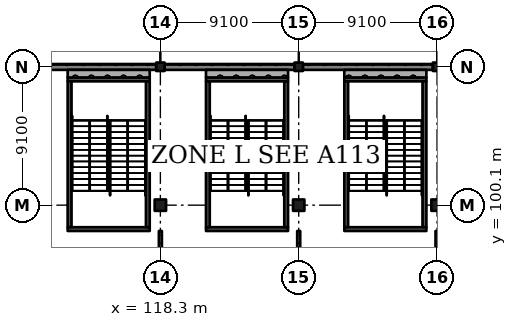
"""IFC4 building model, lengths in metres.
Left out: names, types, materials, properties, quantities, classifications, styles, units other than length and angle.
Written with IfcOpenShell. Run it as: python <this file> out.ifc"""

import sys

from ifc_helpers import new_model, si_unit, direction, frame, frame_2d, origin, origin_2d, place, context, subcontext, project, spatial, rectangle, extrude, element, fill, save


model = new_model("IFC4")
c1 = context("Model", 3, precision=1e-05, world=origin(), true_north=direction((0.0, 1.0)))
c2 = subcontext(c1, "Body", "Model", "MODEL_VIEW")
j1 = project(units=[si_unit("LENGTHUNIT", "METRE"), si_unit("PLANEANGLEUNIT", "RADIAN")], contexts=[c1])
p1 = place(None, origin())
s1 = spatial("IfcSite", under=j1, at=p1, CompositionType="ELEMENT")
p2 = place(p1, origin())
s2 = spatial("IfcBuilding", under=s1, at=p2, CompositionType="ELEMENT")
p3 = place(p2, origin())
s3 = spatial("IfcBuildingStorey", under=s2, at=p3, CompositionType="ELEMENT", Elevation=0.0)
p4 = place(p3, frame((118.3, 100.1, -0.4), z_axis=(0.0, 0.0, 1.0), x_axis=(1.0, 0.0, 0.0)))
e1 = element("IfcColumn", 1, at=p4, inside=s3, PredefinedType="COLUMN", context=c2, shape_type="SweptSolid", body=[
    extrude(rectangle(XDim=0.75, YDim=0.75, at=origin_2d()), origin(), (0.0, 0.0, 1.0), 6.77),
])
p5 = place(p3, frame((118.3, 109.2, -0.4), z_axis=(0.0, 0.0, 1.0), x_axis=(1.0, 0.0, 0.0)))
e2 = element("IfcColumn", 2, at=p5, inside=s3, PredefinedType="COLUMN", context=c2, shape_type="SweptSolid", body=[
    extrude(rectangle(XDim=0.55, YDim=0.55, at=origin_2d()), origin(), (0.0, 0.0, 1.0), 6.77),
])
p6 = place(p3, frame((127.4, 100.1, -0.4), z_axis=(0.0, 0.0, 1.0), x_axis=(1.0, 0.0, 0.0)))
e3 = element("IfcColumn", 3, at=p6, inside=s3, PredefinedType="COLUMN", context=c2, shape_type="SweptSolid", body=[
    extrude(rectangle(XDim=0.75, YDim=0.75, at=origin_2d()), origin(), (0.0, 0.0, 1.0), 6.77),
])
p7 = place(p3, frame((127.4, 109.2, -0.4), z_axis=(0.0, 0.0, 1.0), x_axis=(1.0, 0.0, 0.0)))
e4 = element("IfcColumn", 4, at=p7, inside=s3, PredefinedType="COLUMN", context=c2, shape_type="SweptSolid", body=[
    extrude(rectangle(XDim=0.55, YDim=0.55, at=origin_2d()), origin(), (0.0, 0.0, 1.0), 6.77),
])
p8 = place(p3, frame((136.5, 100.1, -0.4), z_axis=(0.0, 0.0, 1.0), x_axis=(1.0, 0.0, 0.0)))
e5 = element("IfcColumn", 5, at=p8, inside=s3, PredefinedType="COLUMN", context=c2, shape_type="SweptSolid", body=[
    extrude(rectangle(XDim=0.75, YDim=0.75, at=origin_2d()), origin(), (0.0, 0.0, 1.0), 6.77),
])
p9 = place(p3, frame((136.5, 109.2, -0.4), z_axis=(0.0, 0.0, 1.0), x_axis=(1.0, 0.0, 0.0)))
e6 = element("IfcColumn", 6, at=p9, inside=s3, PredefinedType="COLUMN", context=c2, shape_type="SweptSolid", body=[
    extrude(rectangle(XDim=0.55, YDim=0.55, at=origin_2d()), origin(), (0.0, 0.0, 1.0), 6.77),
])
p10 = place(p3, frame((135.8, 98.525, -0.4), z_axis=(0.0, 0.0, 1.0), x_axis=(-1.0, 0.0, 0.0)))
e7 = element("IfcWall", 7, at=p10, inside=s3, PredefinedType="SHEAR", context=c2, shape_type="SweptSolid", body=[
    extrude(rectangle(XDim=5.4, YDim=0.25, at=frame_2d((2.7, 0.0))), origin(), (0.0, 0.0, 1.0), 6.77),
])
p11 = place(p10, frame((1.5, 0.0, 0.4)))
e8 = element("IfcOpeningElement", 8, at=p11, cuts=e7, PredefinedType="OPENING", context=c2, shape_type="SweptSolid", body=[
    extrude(rectangle(XDim=2.4, YDim=2.1, at=frame_2d((1.2, 1.05))), frame((0.0, 0.135, 0.0), z_axis=(0.0, -1.0, 0.0), x_axis=(1.0, 0.0, 0.0)), (0.0, 0.0, 1.0), 0.27),
])
p12 = place(p3, frame((135.8, 108.375, -0.4), z_axis=(0.0, 0.0, 1.0), x_axis=(-1.0, 0.0, 0.0)))
e9 = element("IfcWall", 9, at=p12, inside=s3, PredefinedType="SHEAR", context=c2, shape_type="SweptSolid", body=[
    extrude(rectangle(XDim=5.4, YDim=0.25, at=frame_2d((2.7, 0.0))), origin(), (0.0, 0.0, 1.0), 6.77),
])
p13 = place(p3, frame((130.525, 108.25, -0.4), z_axis=(0.0, 0.0, 1.0), x_axis=(0.0, -1.0, 0.0)))
e10 = element("IfcWall", 10, at=p13, inside=s3, PredefinedType="SHEAR", context=c2, shape_type="SweptSolid", body=[
    extrude(rectangle(XDim=9.6, YDim=0.25, at=frame_2d((4.8, 0.0))), origin(), (0.0, 0.0, 1.0), 6.77),
])
p14 = place(p13, frame((7.95, 0.0, 0.4)))
e11 = element("IfcOpeningElement", 11, at=p14, cuts=e10, PredefinedType="OPENING", context=c2, shape_type="SweptSolid", body=[
    extrude(rectangle(XDim=1.2, YDim=2.1, at=frame_2d((0.6, 1.05))), frame((0.0, 0.135, 0.0), z_axis=(0.0, -1.0, 0.0), x_axis=(1.0, 0.0, 0.0)), (0.0, 0.0, 1.0), 0.27),
])
p15 = place(p3, frame((135.675, 108.25, -0.4), z_axis=(0.0, 0.0, 1.0), x_axis=(0.0, -1.0, 0.0)))
e12 = element("IfcWall", 12, at=p15, inside=s3, PredefinedType="SHEAR", context=c2, shape_type="SweptSolid", body=[
    extrude(rectangle(XDim=9.6, YDim=0.25, at=frame_2d((4.8, 0.0))), origin(), (0.0, 0.0, 1.0), 6.77),
])
p16 = place(p3, frame((126.7, 98.525, -0.4), z_axis=(0.0, 0.0, 1.0), x_axis=(-1.0, 0.0, 0.0)))
e13 = element("IfcWall", 13, at=p16, inside=s3, PredefinedType="SHEAR", context=c2, shape_type="SweptSolid", body=[
    extrude(rectangle(XDim=5.4, YDim=0.25, at=frame_2d((2.7, 0.0))), origin(), (0.0, 0.0, 1.0), 6.77),
])
p17 = place(p16, frame((1.5, 0.0, 0.4)))
e14 = element("IfcOpeningElement", 14, at=p17, cuts=e13, PredefinedType="OPENING", context=c2, shape_type="SweptSolid", body=[
    extrude(rectangle(XDim=2.4, YDim=2.1, at=frame_2d((1.2, 1.05))), frame((0.0, 0.135, 0.0), z_axis=(0.0, -1.0, 0.0), x_axis=(1.0, 0.0, 0.0)), (0.0, 0.0, 1.0), 0.27),
])
p18 = place(p3, frame((126.7, 108.375, -0.4), z_axis=(0.0, 0.0, 1.0), x_axis=(-1.0, 0.0, 0.0)))
e15 = element("IfcWall", 15, at=p18, inside=s3, PredefinedType="SHEAR", context=c2, shape_type="SweptSolid", body=[
    extrude(rectangle(XDim=5.4, YDim=0.25, at=frame_2d((2.7, 0.0))), origin(), (0.0, 0.0, 1.0), 6.77),
])
p19 = place(p3, frame((121.425, 108.25, -0.4), z_axis=(0.0, 0.0, 1.0), x_axis=(0.0, -1.0, 0.0)))
e16 = element("IfcWall", 16, at=p19, inside=s3, PredefinedType="SHEAR", context=c2, shape_type="SweptSolid", body=[
    extrude(rectangle(XDim=9.6, YDim=0.25, at=frame_2d((4.8, 0.0))), origin(), (0.0, 0.0, 1.0), 6.77),
])
p20 = place(p19, frame((7.95, 0.0, 0.4)))
e17 = element("IfcOpeningElement", 17, at=p20, cuts=e16, PredefinedType="OPENING", context=c2, shape_type="SweptSolid", body=[
    extrude(rectangle(XDim=1.2, YDim=2.1, at=frame_2d((0.6, 1.05))), frame((0.0, 0.135, 0.0), z_axis=(0.0, -1.0, 0.0), x_axis=(1.0, 0.0, 0.0)), (0.0, 0.0, 1.0), 0.27),
])
p21 = place(p3, frame((126.575, 108.25, -0.4), z_axis=(0.0, 0.0, 1.0), x_axis=(0.0, -1.0, 0.0)))
e18 = element("IfcWall", 18, at=p21, inside=s3, PredefinedType="SHEAR", context=c2, shape_type="SweptSolid", body=[
    extrude(rectangle(XDim=9.6, YDim=0.25, at=frame_2d((4.8, 0.0))), origin(), (0.0, 0.0, 1.0), 6.77),
])
p22 = place(p3, frame((117.6, 98.525, -0.4), z_axis=(0.0, 0.0, 1.0), x_axis=(-1.0, 0.0, 0.0)))
e19 = element("IfcWall", 19, at=p22, inside=s3, PredefinedType="SHEAR", context=c2, shape_type="SweptSolid", body=[
    extrude(rectangle(XDim=5.4, YDim=0.25, at=frame_2d((2.7, 0.0))), origin(), (0.0, 0.0, 1.0), 6.77),
])
p23 = place(p22, frame((1.5, 0.0, 0.4)))
e20 = element("IfcOpeningElement", 20, at=p23, cuts=e19, PredefinedType="OPENING", context=c2, shape_type="SweptSolid", body=[
    extrude(rectangle(XDim=2.4, YDim=2.1, at=frame_2d((1.2, 1.05))), frame((0.0, 0.135, 0.0), z_axis=(0.0, -1.0, 0.0), x_axis=(1.0, 0.0, 0.0)), (0.0, 0.0, 1.0), 0.27),
])
p24 = place(p3, frame((117.6, 108.375, -0.4), z_axis=(0.0, 0.0, 1.0), x_axis=(-1.0, 0.0, 0.0)))
e21 = element("IfcWall", 21, at=p24, inside=s3, PredefinedType="SHEAR", context=c2, shape_type="SweptSolid", body=[
    extrude(rectangle(XDim=5.4, YDim=0.25, at=frame_2d((2.7, 0.0))), origin(), (0.0, 0.0, 1.0), 6.77),
])
p25 = place(p3, frame((112.325, 108.25, -0.4), z_axis=(0.0, 0.0, 1.0), x_axis=(0.0, -1.0, 0.0)))
e22 = element("IfcWall", 22, at=p25, inside=s3, PredefinedType="SHEAR", context=c2, shape_type="SweptSolid", body=[
    extrude(rectangle(XDim=9.6, YDim=0.25, at=frame_2d((4.8, 0.0))), origin(), (0.0, 0.0, 1.0), 6.77),
])
p26 = place(p25, frame((7.95, 0.0, 0.4)))
e23 = element("IfcOpeningElement", 23, at=p26, cuts=e22, PredefinedType="OPENING", context=c2, shape_type="SweptSolid", body=[
    extrude(rectangle(XDim=1.2, YDim=2.1, at=frame_2d((0.6, 1.05))), frame((0.0, 0.135, 0.0), z_axis=(0.0, -1.0, 0.0), x_axis=(1.0, 0.0, 0.0)), (0.0, 0.0, 1.0), 0.27),
])
p27 = place(p3, frame((117.475, 108.25, -0.4), z_axis=(0.0, 0.0, 1.0), x_axis=(0.0, -1.0, 0.0)))
e24 = element("IfcWall", 24, at=p27, inside=s3, PredefinedType="SHEAR", context=c2, shape_type="SweptSolid", body=[
    extrude(rectangle(XDim=9.6, YDim=0.25, at=frame_2d((4.8, 0.0))), origin(), (0.0, 0.0, 1.0), 6.77),
])
p28 = place(p3, frame((136.225, 109.175, 0.0), z_axis=(0.0, 0.0, 1.0), x_axis=(-1.0, 0.0, 0.0)))
e25 = element("IfcWall", 25, at=p28, inside=s3, PredefinedType="SOLIDWALL", context=c2, shape_type="SweptSolid", body=[
    extrude(rectangle(XDim=8.55, YDim=0.35, at=frame_2d((4.275, 0.0))), origin(), (0.0, 0.0, 1.0), 5.27),
])
p29 = place(p28, frame((5.975, 0.0, 0.0)))
e26 = element("IfcOpeningElement", 26, at=p29, cuts=e25, PredefinedType="OPENING", context=c2, shape_type="SweptSolid", body=[
    extrude(rectangle(XDim=2.1, YDim=2.4, at=frame_2d((1.05, 1.2))), frame((0.0, 0.185, 0.0), z_axis=(0.0, -1.0, 0.0), x_axis=(1.0, 0.0, 0.0)), (0.0, 0.0, 1.0), 0.37),
])
p30 = place(p3, frame((127.125, 109.175, 0.0), z_axis=(0.0, 0.0, 1.0), x_axis=(-1.0, 0.0, 0.0)))
e27 = element("IfcWall", 27, at=p30, inside=s3, PredefinedType="SOLIDWALL", context=c2, shape_type="SweptSolid", body=[
    extrude(rectangle(XDim=8.55, YDim=0.35, at=frame_2d((4.275, 0.0))), origin(), (0.0, 0.0, 1.0), 5.27),
])
p31 = place(p30, frame((5.975, 0.0, 0.0)))
e28 = element("IfcOpeningElement", 28, at=p31, cuts=e27, PredefinedType="OPENING", context=c2, shape_type="SweptSolid", body=[
    extrude(rectangle(XDim=2.1, YDim=2.4, at=frame_2d((1.05, 1.2))), frame((0.0, 0.185, 0.0), z_axis=(0.0, -1.0, 0.0), x_axis=(1.0, 0.0, 0.0)), (0.0, 0.0, 1.0), 0.37),
])
p32 = place(p3, frame((118.025, 109.175, 0.0), z_axis=(0.0, 0.0, 1.0), x_axis=(-1.0, 0.0, 0.0)))
e29 = element("IfcWall", 29, at=p32, inside=s3, PredefinedType="SOLIDWALL", context=c2, shape_type="SweptSolid", body=[
    extrude(rectangle(XDim=8.5, YDim=0.35, at=frame_2d((4.25, 0.0))), origin(), (0.0, 0.0, 1.0), 5.27),
])
p33 = place(p32, frame((5.975, 0.0, 0.0)))
e30 = element("IfcOpeningElement", 30, at=p33, cuts=e29, PredefinedType="OPENING", context=c2, shape_type="SweptSolid", body=[
    extrude(rectangle(XDim=2.1, YDim=2.4, at=frame_2d((1.05, 1.2))), frame((0.0, 0.185, 0.0), z_axis=(0.0, -1.0, 0.0), x_axis=(1.0, 0.0, 0.0)), (0.0, 0.0, 1.0), 0.37),
])
p34 = place(p3, frame((130.4, 108.75, 0.0), z_axis=(0.0, 0.0, 1.0), x_axis=(1.0, 0.0, 0.0)))
e31 = element("IfcWall", 31, at=p34, inside=s3, PredefinedType="SOLIDWALL", context=c2, shape_type="SweptSolid", body=[
    extrude(rectangle(XDim=5.4, YDim=0.5, at=frame_2d((2.7, 0.0))), origin(), (0.0, 0.0, 1.0), 6.37),
])
p35 = place(p3, frame((121.3, 108.75, 0.0), z_axis=(0.0, 0.0, 1.0), x_axis=(1.0, 0.0, 0.0)))
e32 = element("IfcWall", 32, at=p35, inside=s3, PredefinedType="SOLIDWALL", context=c2, shape_type="SweptSolid", body=[
    extrude(rectangle(XDim=5.4, YDim=0.5, at=frame_2d((2.7, 0.0))), origin(), (0.0, 0.0, 1.0), 6.37),
])
p36 = place(p3, frame((112.2, 108.75, 0.0), z_axis=(0.0, 0.0, 1.0), x_axis=(1.0, 0.0, 0.0)))
e33 = element("IfcWall", 33, at=p36, inside=s3, PredefinedType="SOLIDWALL", context=c2, shape_type="SweptSolid", body=[
    extrude(rectangle(XDim=5.4, YDim=0.5, at=frame_2d((2.7, 0.0))), origin(), (0.0, 0.0, 1.0), 6.37),
])
p37 = place(p3, frame((118.3, 91.475, 0.0), z_axis=(0.0, 0.0, 1.0), x_axis=(0.0, 1.0, 0.0)))
e34 = element("IfcWall", 34, at=p37, inside=s3, PredefinedType="PARTITIONING", context=c2, shape_type="SweptSolid", body=[
    extrude(rectangle(XDim=6.925, YDim=0.2, at=frame_2d((3.462, 0.0))), origin(), (0.0, 0.0, 1.0), 5.32),
])
p38 = place(p37, frame((0.85, 0.0, 0.0)))
e35 = element("IfcOpeningElement", 35, at=p38, cuts=e34, PredefinedType="OPENING", context=c2, shape_type="SweptSolid", body=[
    extrude(rectangle(XDim=1.8, YDim=2.4, at=frame_2d((0.9, 1.2))), frame((0.0, 0.11, 0.0), z_axis=(0.0, -1.0, 0.0), x_axis=(1.0, 0.0, 0.0)), (0.0, 0.0, 1.0), 0.22),
])
p39 = place(p37, frame((4.25, 0.0, 0.0)))
e36 = element("IfcOpeningElement", 36, at=p39, cuts=e34, PredefinedType="OPENING", context=c2, shape_type="SweptSolid", body=[
    extrude(rectangle(XDim=1.8, YDim=2.4, at=frame_2d((0.9, 1.2))), frame((0.0, 0.11, 0.0), z_axis=(0.0, -1.0, 0.0), x_axis=(1.0, 0.0, 0.0)), (0.0, 0.0, 1.0), 0.22),
])
p40 = place(p3, frame((127.4, 91.45, 0.0), z_axis=(0.0, 0.0, 1.0), x_axis=(0.0, 1.0, 0.0)))
e37 = element("IfcWall", 37, at=p40, inside=s3, PredefinedType="PARTITIONING", context=c2, shape_type="SweptSolid", body=[
    extrude(rectangle(XDim=6.95, YDim=0.2, at=frame_2d((3.475, 0.0))), origin(), (0.0, 0.0, 1.0), 5.32),
])
p41 = place(p40, frame((0.85, 0.0, 0.0)))
e38 = element("IfcOpeningElement", 38, at=p41, cuts=e37, PredefinedType="OPENING", context=c2, shape_type="SweptSolid", body=[
    extrude(rectangle(XDim=1.8, YDim=2.4, at=frame_2d((0.9, 1.2))), frame((0.0, 0.11, 0.0), z_axis=(0.0, -1.0, 0.0), x_axis=(1.0, 0.0, 0.0)), (0.0, 0.0, 1.0), 0.22),
])
p42 = place(p40, frame((4.35, 0.0, 0.0)))
e39 = element("IfcOpeningElement", 39, at=p42, cuts=e37, PredefinedType="OPENING", context=c2, shape_type="SweptSolid", body=[
    extrude(rectangle(XDim=1.8, YDim=2.4, at=frame_2d((0.9, 1.2))), frame((0.0, 0.11, 0.0), z_axis=(0.0, -1.0, 0.0), x_axis=(1.0, 0.0, 0.0)), (0.0, 0.0, 1.0), 0.22),
])
p43 = place(p3, frame((136.5, 91.425, 0.0), z_axis=(0.0, 0.0, 1.0), x_axis=(0.0, 1.0, 0.0)))
e40 = element("IfcWall", 40, at=p43, inside=s3, PredefinedType="PARTITIONING", context=c2, shape_type="SweptSolid", body=[
    extrude(rectangle(XDim=6.975, YDim=0.2, at=frame_2d((3.487, 0.0))), origin(), (0.0, 0.0, 1.0), 5.32),
])
p44 = place(p43, frame((0.85, 0.0, 0.0)))
e41 = element("IfcOpeningElement", 41, at=p44, cuts=e40, PredefinedType="OPENING", context=c2, shape_type="SweptSolid", body=[
    extrude(rectangle(XDim=1.8, YDim=2.4, at=frame_2d((0.9, 1.2))), frame((0.0, 0.11, 0.0), z_axis=(0.0, -1.0, 0.0), x_axis=(1.0, 0.0, 0.0)), (0.0, 0.0, 1.0), 0.22),
])
p45 = place(p43, frame((4.35, 0.0, 0.0)))
e42 = element("IfcOpeningElement", 42, at=p45, cuts=e40, PredefinedType="OPENING", context=c2, shape_type="SweptSolid", body=[
    extrude(rectangle(XDim=1.8, YDim=2.4, at=frame_2d((0.9, 1.2))), frame((0.0, 0.11, 0.0), z_axis=(0.0, -1.0, 0.0), x_axis=(1.0, 0.0, 0.0)), (0.0, 0.0, 1.0), 0.22),
])
p46 = place(p29, frame((2.1, 0.0, 0.0), z_axis=(0.0, 0.0, 1.0), x_axis=(-1.0, 0.0, 0.0)))
e43 = element("IfcDoor", 43, at=p46, inside=s3, OperationType="DOUBLE_DOOR_SINGLE_SWING", PredefinedType="DOOR", context=c2, shape_type="SweptSolid", body=[
    extrude(rectangle(XDim=2.1, YDim=2.4, at=frame_2d((1.05, 1.2))), frame((0.0, 0.025, 0.0), z_axis=(0.0, -1.0, 0.0), x_axis=(1.0, 0.0, 0.0)), (0.0, 0.0, 1.0), 0.05),
])
fill(e26, e43)
p47 = place(p31, frame((2.1, 0.0, 0.0), z_axis=(0.0, 0.0, 1.0), x_axis=(-1.0, 0.0, 0.0)))
e44 = element("IfcDoor", 44, at=p47, inside=s3, OperationType="DOUBLE_DOOR_SINGLE_SWING", PredefinedType="DOOR", context=c2, shape_type="SweptSolid", body=[
    extrude(rectangle(XDim=2.1, YDim=2.4, at=frame_2d((1.05, 1.2))), frame((0.0, 0.025, 0.0), z_axis=(0.0, -1.0, 0.0), x_axis=(1.0, 0.0, 0.0)), (0.0, 0.0, 1.0), 0.05),
])
fill(e28, e44)
p48 = place(p33, frame((2.1, 0.0, 0.0), z_axis=(0.0, 0.0, 1.0), x_axis=(-1.0, 0.0, 0.0)))
e45 = element("IfcDoor", 45, at=p48, inside=s3, OperationType="DOUBLE_DOOR_SINGLE_SWING", PredefinedType="DOOR", context=c2, shape_type="SweptSolid", body=[
    extrude(rectangle(XDim=2.1, YDim=2.4, at=frame_2d((1.05, 1.2))), frame((0.0, 0.025, 0.0), z_axis=(0.0, -1.0, 0.0), x_axis=(1.0, 0.0, 0.0)), (0.0, 0.0, 1.0), 0.05),
])
fill(e30, e45)
p49 = place(p45, origin())
e46 = element("IfcDoor", 46, at=p49, inside=s3, OperationType="DOUBLE_DOOR_SINGLE_SWING", PredefinedType="DOOR", context=c2, shape_type="SweptSolid", body=[
    extrude(rectangle(XDim=1.8, YDim=2.4, at=frame_2d((0.9, 1.2))), frame((0.0, 0.025, 0.0), z_axis=(0.0, -1.0, 0.0), x_axis=(1.0, 0.0, 0.0)), (0.0, 0.0, 1.0), 0.05),
])
fill(e42, e46)
p50 = place(p42, origin())
e47 = element("IfcDoor", 47, at=p50, inside=s3, OperationType="DOUBLE_DOOR_SINGLE_SWING", PredefinedType="DOOR", context=c2, shape_type="SweptSolid", body=[
    extrude(rectangle(XDim=1.8, YDim=2.4, at=frame_2d((0.9, 1.2))), frame((0.0, 0.025, 0.0), z_axis=(0.0, -1.0, 0.0), x_axis=(1.0, 0.0, 0.0)), (0.0, 0.0, 1.0), 0.05),
])
fill(e39, e47)
p51 = place(p39, origin())
e48 = element("IfcDoor", 48, at=p51, inside=s3, OperationType="DOUBLE_DOOR_SINGLE_SWING", PredefinedType="DOOR", context=c2, shape_type="SweptSolid", body=[
    extrude(rectangle(XDim=1.8, YDim=2.4, at=frame_2d((0.9, 1.2))), frame((0.0, 0.025, 0.0), z_axis=(0.0, -1.0, 0.0), x_axis=(1.0, 0.0, 0.0)), (0.0, 0.0, 1.0), 0.05),
])
fill(e36, e48)
p52 = place(p11, origin())
e49 = element("IfcDoor", 49, at=p52, inside=s3, OperationType="DOUBLE_DOOR_SINGLE_SWING", PredefinedType="DOOR", context=c2, shape_type="SweptSolid", body=[
    extrude(rectangle(XDim=2.4, YDim=2.1, at=frame_2d((1.2, 1.05))), frame((0.0, 0.025, 0.0), z_axis=(0.0, -1.0, 0.0), x_axis=(1.0, 0.0, 0.0)), (0.0, 0.0, 1.0), 0.05),
])
fill(e8, e49)
p53 = place(p17, origin())
e50 = element("IfcDoor", 50, at=p53, inside=s3, OperationType="DOUBLE_DOOR_SINGLE_SWING", PredefinedType="DOOR", context=c2, shape_type="SweptSolid", body=[
    extrude(rectangle(XDim=2.4, YDim=2.1, at=frame_2d((1.2, 1.05))), frame((0.0, 0.025, 0.0), z_axis=(0.0, -1.0, 0.0), x_axis=(1.0, 0.0, 0.0)), (0.0, 0.0, 1.0), 0.05),
])
fill(e14, e50)
p54 = place(p23, origin())
e51 = element("IfcDoor", 51, at=p54, inside=s3, OperationType="DOUBLE_DOOR_SINGLE_SWING", PredefinedType="DOOR", context=c2, shape_type="SweptSolid", body=[
    extrude(rectangle(XDim=2.4, YDim=2.1, at=frame_2d((1.2, 1.05))), frame((0.0, 0.025, 0.0), z_axis=(0.0, -1.0, 0.0), x_axis=(1.0, 0.0, 0.0)), (0.0, 0.0, 1.0), 0.05),
])
fill(e20, e51)
p55 = place(p14, origin())
e52 = element("IfcDoor", 52, at=p55, inside=s3, OperationType="SINGLE_SWING_RIGHT", PredefinedType="DOOR", context=c2, shape_type="SweptSolid", body=[
    extrude(rectangle(XDim=1.2, YDim=2.1, at=frame_2d((0.6, 1.05))), frame((0.0, 0.025, 0.0), z_axis=(0.0, -1.0, 0.0), x_axis=(1.0, 0.0, 0.0)), (0.0, 0.0, 1.0), 0.05),
])
fill(e11, e52)
p56 = place(p20, origin())
e53 = element("IfcDoor", 53, at=p56, inside=s3, OperationType="SINGLE_SWING_RIGHT", PredefinedType="DOOR", context=c2, shape_type="SweptSolid", body=[
    extrude(rectangle(XDim=1.2, YDim=2.1, at=frame_2d((0.6, 1.05))), frame((0.0, 0.025, 0.0), z_axis=(0.0, -1.0, 0.0), x_axis=(1.0, 0.0, 0.0)), (0.0, 0.0, 1.0), 0.05),
])
fill(e17, e53)
p57 = place(p26, origin())
e54 = element("IfcDoor", 54, at=p57, inside=s3, OperationType="SINGLE_SWING_RIGHT", PredefinedType="DOOR", context=c2, shape_type="SweptSolid", body=[
    extrude(rectangle(XDim=1.2, YDim=2.1, at=frame_2d((0.6, 1.05))), frame((0.0, 0.025, 0.0), z_axis=(0.0, -1.0, 0.0), x_axis=(1.0, 0.0, 0.0)), (0.0, 0.0, 1.0), 0.05),
])
fill(e23, e54)
save(model, sys.argv[1])
